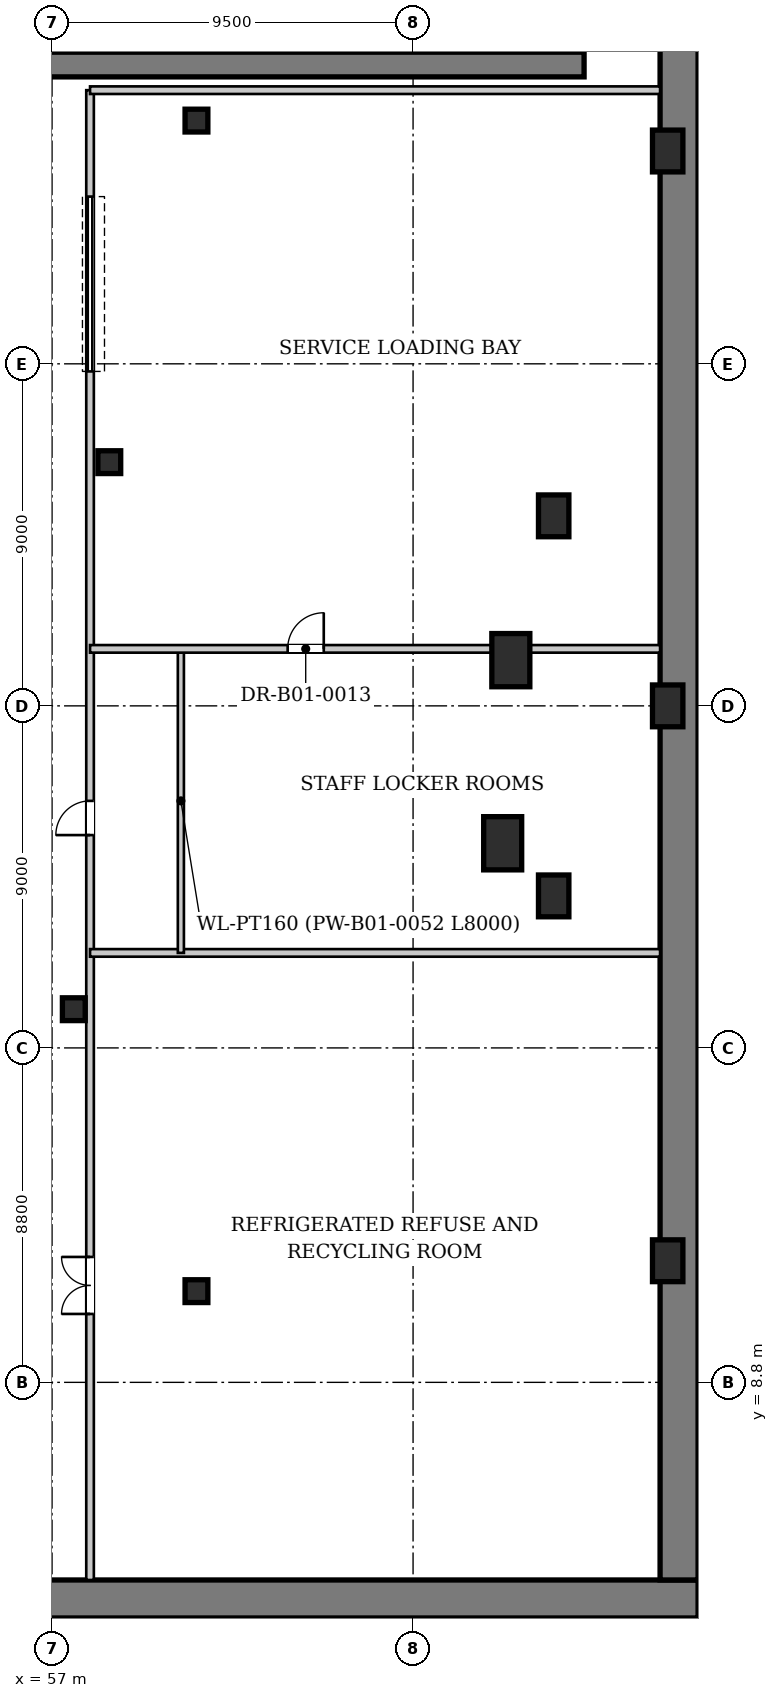
"""IFC4 building model, lengths in metres.
Left out: names, types, materials, properties, quantities, classifications, styles, units other than length and angle.
Written with IfcOpenShell. Run it as: python <this file> out.ifc"""

import sys

from ifc_helpers import new_model, si_unit, direction, frame, frame_2d, origin, origin_2d, place, context, subcontext, project, spatial, rectangle, hollow_rectangle, extrude, source, transform, mapped, element, fill, save


model = new_model("IFC4")
c1 = context("Model", 3, precision=1e-05, world=origin(), true_north=direction((0.0, 1.0)))
c2 = subcontext(c1, "Body", "Model", "MODEL_VIEW")
j1 = project(units=[si_unit("LENGTHUNIT", "METRE"), si_unit("PLANEANGLEUNIT", "RADIAN")], contexts=[c1])
p1 = place(None, origin())
s1 = spatial("IfcSite", under=j1, at=p1, CompositionType="ELEMENT")
p2 = place(p1, origin())
s2 = spatial("IfcBuilding", under=s1, at=p2, CompositionType="ELEMENT")
p3 = place(p2, frame((0.0, 0.0, -4.8)))
s3 = spatial("IfcBuildingStorey", under=s2, at=p3, CompositionType="ELEMENT", Elevation=-4.8)
p4 = place(p3, frame((2.0, 3.1, 0.0), z_axis=(0.0, 0.0, 1.0), x_axis=(1.0, 0.0, 0.0)))
e1 = element("IfcWall", 1, at=p4, inside=s3, PredefinedType="SOLIDWALL", context=c2, shape_type="SweptSolid", body=[
    extrude(rectangle(XDim=72.0, YDim=1.0, at=frame_2d((36.0, 0.0))), origin(), (0.0, 0.0, 1.0), 4.48),
])
p5 = place(p3, frame((73.5, 3.6, 0.0), z_axis=(0.0, 0.0, 1.0), x_axis=(0.0, 1.0, 0.0)))
e2 = element("IfcWall", 2, at=p5, inside=s3, PredefinedType="SOLIDWALL", context=c2, shape_type="SweptSolid", body=[
    extrude(rectangle(XDim=46.0, YDim=1.0, at=frame_2d((23.0, 0.0))), origin(), (0.0, 0.0, 1.0), 4.48),
])
p6 = place(p3, frame((10.0, 43.475, 0.0), z_axis=(0.0, 0.0, 1.0), x_axis=(1.0, 0.0, 0.0)))
e3 = element("IfcWall", 3, at=p6, inside=s3, PredefinedType="SOLIDWALL", context=c2, shape_type="SweptSolid", body=[
    extrude(rectangle(XDim=61.0, YDim=0.65, at=frame_2d((30.5, 0.0))), origin(), (0.0, 0.0, 1.0), 4.48),
])
m1 = source(origin(), c2, "Body", "SweptSolid", [
    extrude(rectangle(XDim=1.0, YDim=1.4, at=origin_2d()), origin(), (0.0, 0.0, 1.0), 4.635),
])
for number, where, z_axis, x_axis in (
    (4, (68.858, 22.985, 0.0), (0.0, 0.0, 1.0), (1.0, 0.0, 0.0)),
    (5, (69.073, 27.803, 0.0), (0.0, 0.0, 1.0), (1.0, 0.0, 0.0)),
):
    element("IfcColumn", number, at=place(p3, frame(where, z_axis=z_axis, x_axis=x_axis)), inside=s3, PredefinedType="COLUMN", context=c2, shape_type="MappedRepresentation", body=[
        mapped(m1, transform((0.0, 0.0, 0.0), x_axis=(1.0, 0.0, 0.0), y_axis=(0.0, 1.0, 0.0), z_axis=(0.0, 0.0, 1.0), scale=1.0)),
    ])
m2 = source(origin(), c2, "Body", "SweptSolid", [
    extrude(hollow_rectangle(XDim=0.6, YDim=0.6, WallThickness=0.035, at=origin_2d()), origin(), (0.0, 0.0, 1.0), 4.635),
])
for number, where, z_axis, x_axis in (
    (6, (60.8, 11.2, 0.0), (0.0, 0.0, 1.0), (1.0, 0.0, 0.0)),
    (7, (60.8, 42.0, 0.0), (0.0, 0.0, 1.0), (1.0, 0.0, 0.0)),
):
    element("IfcColumn", number, at=place(p3, frame(where, z_axis=z_axis, x_axis=x_axis)), inside=s3, PredefinedType="COLUMN", context=c2, shape_type="MappedRepresentation", body=[
        mapped(m2, transform((0.0, 0.0, 0.0), x_axis=(1.0, 0.0, 0.0), y_axis=(0.0, 1.0, 0.0), z_axis=(0.0, 0.0, 1.0), scale=1.0)),
    ])
m3 = source(origin(), c2, "Body", "SweptSolid", [
    extrude(rectangle(XDim=0.8, YDim=1.1, at=origin_2d()), origin(), (0.0, 0.0, 1.0), 4.635),
])
for number, where, z_axis, x_axis in (
    (8, (73.2, 12.0, 0.0), (0.0, 0.0, 1.0), (1.0, 0.0, 0.0)),
    (9, (73.2, 26.6, 0.0), (0.0, 0.0, 1.0), (1.0, 0.0, 0.0)),
    (10, (73.2, 41.2, 0.0), (0.0, 0.0, 1.0), (1.0, 0.0, 0.0)),
):
    element("IfcColumn", number, at=place(p3, frame(where, z_axis=z_axis, x_axis=x_axis)), inside=s3, PredefinedType="COLUMN", context=c2, shape_type="MappedRepresentation", body=[
        mapped(m3, transform((0.0, 0.0, 0.0), x_axis=(1.0, 0.0, 0.0), y_axis=(0.0, 1.0, 0.0), z_axis=(0.0, 0.0, 1.0), scale=1.0)),
    ])
for number, where, z_axis, x_axis in (
    (11, (58.507, 33.013, 0.0), (0.0, 0.0, 1.0), (1.0, 0.0, 0.0)),
    (12, (57.572, 18.618, 0.0), (0.0, 0.0, 1.0), (1.0, 0.0, 0.0)),
):
    element("IfcColumn", number, at=place(p3, frame(where, z_axis=z_axis, x_axis=x_axis)), inside=s3, PredefinedType="COLUMN", context=c2, shape_type="MappedRepresentation", body=[
        mapped(m2, transform((0.0, 0.0, 0.0), x_axis=(1.0, 0.0, 0.0), y_axis=(0.0, 1.0, 0.0), z_axis=(0.0, 0.0, 1.0), scale=1.0)),
    ])
for number, where, z_axis, x_axis in (
    (13, (70.2, 21.6, 0.0), (0.0, 0.0, 1.0), (1.0, 0.0, 0.0)),
    (14, (70.2, 31.6, 0.0), (0.0, 0.0, 1.0), (1.0, 0.0, 0.0)),
):
    element("IfcColumn", number, at=place(p3, frame(where, z_axis=z_axis, x_axis=x_axis)), inside=s3, PredefinedType="COLUMN", context=c2, shape_type="MappedRepresentation", body=[
        mapped(m3, transform((0.0, 0.0, 0.0), x_axis=(1.0, 0.0, 0.0), y_axis=(0.0, 1.0, 0.0), z_axis=(0.0, 0.0, 1.0), scale=1.0)),
    ])
p7 = place(p3, frame((58.0, 3.6, 0.0), z_axis=(0.0, 0.0, 1.0), x_axis=(0.0, 1.0, 0.0)))
e15 = element("IfcWall", 15, at=p7, inside=s3, PredefinedType="PARTITIONING", context=c2, shape_type="SweptSolid", body=[
    extrude(rectangle(XDim=39.2, YDim=0.2, at=frame_2d((19.6, 0.0))), origin(), (0.0, 0.0, 1.0), 4.48),
])
p8 = place(p7, frame((7.0, 0.0, 0.0)))
e16 = element("IfcOpeningElement", 16, at=p8, cuts=e15, PredefinedType="OPENING", context=c2, shape_type="SweptSolid", body=[
    extrude(rectangle(XDim=1.5, YDim=2.25, at=frame_2d((0.75, 1.125))), frame((0.0, 0.11, 0.0), z_axis=(0.0, -1.0, 0.0), x_axis=(1.0, 0.0, 0.0)), (0.0, 0.0, 1.0), 0.22),
])
p9 = place(p7, frame((19.6, 0.0, 0.0)))
e17 = element("IfcOpeningElement", 17, at=p9, cuts=e15, PredefinedType="OPENING", context=c2, shape_type="SweptSolid", body=[
    extrude(rectangle(XDim=0.9, YDim=2.1, at=frame_2d((0.45, 1.05))), frame((0.0, 0.11, 0.0), z_axis=(0.0, -1.0, 0.0), x_axis=(1.0, 0.0, 0.0)), (0.0, 0.0, 1.0), 0.22),
])
p10 = place(p7, frame((31.8, 0.0, 0.0)))
e18 = element("IfcOpeningElement", 18, at=p10, cuts=e15, PredefinedType="OPENING", context=c2, shape_type="SweptSolid", body=[
    extrude(rectangle(XDim=4.6, YDim=3.8, at=frame_2d((2.3, 1.9))), frame((0.0, 0.11, 0.0), z_axis=(0.0, -1.0, 0.0), x_axis=(1.0, 0.0, 0.0)), (0.0, 0.0, 1.0), 0.22),
])
p11 = place(p3, frame((58.0, 20.1, 0.0), z_axis=(0.0, 0.0, 1.0), x_axis=(1.0, 0.0, 0.0)))
e19 = element("IfcWall", 19, at=p11, inside=s3, PredefinedType="PARTITIONING", context=c2, shape_type="SweptSolid", body=[
    extrude(rectangle(XDim=15.0, YDim=0.2, at=frame_2d((7.5, 0.0))), origin(), (0.0, 0.0, 1.0), 3.665),
])
p12 = place(p3, frame((60.39, 20.1, 0.0), z_axis=(0.0, 0.0, 1.0), x_axis=(0.0, 1.0, 0.0)))
e20 = element("IfcWall", 20, at=p12, inside=s3, PredefinedType="PARTITIONING", context=c2, shape_type="SweptSolid", body=[
    extrude(rectangle(XDim=8.0, YDim=0.16, at=frame_2d((4.0, 0.0))), origin(), (0.0, 0.0, 1.0), 4.48),
])
p13 = place(p3, frame((58.0, 28.1, 0.0), z_axis=(0.0, 0.0, 1.0), x_axis=(1.0, 0.0, 0.0)))
e21 = element("IfcWall", 21, at=p13, inside=s3, PredefinedType="PARTITIONING", context=c2, shape_type="SweptSolid", body=[
    extrude(rectangle(XDim=15.0, YDim=0.2, at=frame_2d((7.5, 0.0))), origin(), (0.0, 0.0, 1.0), 3.665),
])
p14 = place(p13, frame((5.2, 0.0, 0.0)))
e22 = element("IfcOpeningElement", 22, at=p14, cuts=e21, PredefinedType="OPENING", context=c2, shape_type="SweptSolid", body=[
    extrude(rectangle(XDim=0.95, YDim=2.1, at=frame_2d((0.475, 1.05))), frame((0.0, 0.11, 0.0), z_axis=(0.0, -1.0, 0.0), x_axis=(1.0, 0.0, 0.0)), (0.0, 0.0, 1.0), 0.22),
])
p15 = place(p3, frame((58.0, 42.8, 0.0), z_axis=(0.0, 0.0, 1.0), x_axis=(1.0, 0.0, 0.0)))
e23 = element("IfcWall", 23, at=p15, inside=s3, PredefinedType="PARTITIONING", context=c2, shape_type="SweptSolid", body=[
    extrude(rectangle(XDim=15.0, YDim=0.2, at=frame_2d((7.5, 0.0))), origin(), (0.0, 0.0, 1.0), 4.48),
])
m4 = source(origin(), c2, "Body", "SweptSolid", [
    extrude(rectangle(XDim=1.5, YDim=2.25, at=frame_2d((0.75, 1.125))), frame((0.0, 0.025, 0.0), z_axis=(0.0, -1.0, 0.0), x_axis=(1.0, 0.0, 0.0)), (0.0, 0.0, 1.0), 0.05),
])
p16 = place(p8, origin())
e24 = element("IfcDoor", 24, at=p16, inside=s3, OperationType="DOUBLE_DOOR_SINGLE_SWING", PredefinedType="DOOR", context=c2, shape_type="MappedRepresentation", body=[
    mapped(m4, transform((0.0, 0.0, 0.0), x_axis=(1.0, 0.0, 0.0), y_axis=(0.0, 1.0, 0.0), z_axis=(0.0, 0.0, 1.0), scale=1.0)),
])
fill(e16, e24)
m5 = source(origin(), c2, "Body", "SweptSolid", [
    extrude(rectangle(XDim=0.9, YDim=2.1, at=frame_2d((0.45, 1.05))), frame((0.0, 0.025, 0.0), z_axis=(0.0, -1.0, 0.0), x_axis=(1.0, 0.0, 0.0)), (0.0, 0.0, 1.0), 0.05),
])
p17 = place(p9, origin())
e25 = element("IfcDoor", 25, at=p17, inside=s3, OperationType="SINGLE_SWING_LEFT", PredefinedType="DOOR", context=c2, shape_type="MappedRepresentation", body=[
    mapped(m5, transform((0.0, 0.0, 0.0), x_axis=(1.0, 0.0, 0.0), y_axis=(0.0, 1.0, 0.0), z_axis=(0.0, 0.0, 1.0), scale=1.0)),
])
fill(e17, e25)
m6 = source(origin(), c2, "Body", "SweptSolid", [
    extrude(rectangle(XDim=4.6, YDim=3.8, at=frame_2d((2.3, 1.9))), frame((0.0, 0.025, 0.0), z_axis=(0.0, -1.0, 0.0), x_axis=(1.0, 0.0, 0.0)), (0.0, 0.0, 1.0), 0.05),
])
p18 = place(p10, origin())
e26 = element("IfcDoor", 26, at=p18, inside=s3, OperationType="ROLLINGUP", PredefinedType="GATE", context=c2, shape_type="MappedRepresentation", body=[
    mapped(m6, transform((0.0, 0.0, 0.0), x_axis=(1.0, 0.0, 0.0), y_axis=(0.0, 1.0, 0.0), z_axis=(0.0, 0.0, 1.0), scale=1.0)),
])
fill(e18, e26)
m7 = source(origin(), c2, "Body", "SweptSolid", [
    extrude(rectangle(XDim=0.95, YDim=2.1, at=frame_2d((0.475, 1.05))), frame((0.0, 0.025, 0.0), z_axis=(0.0, -1.0, 0.0), x_axis=(1.0, 0.0, 0.0)), (0.0, 0.0, 1.0), 0.05),
])
p19 = place(p14, origin())
e27 = element("IfcDoor", 27, at=p19, inside=s3, OperationType="SINGLE_SWING_RIGHT", PredefinedType="DOOR", context=c2, shape_type="MappedRepresentation", body=[
    mapped(m7, transform((0.0, 0.0, 0.0), x_axis=(1.0, 0.0, 0.0), y_axis=(0.0, 1.0, 0.0), z_axis=(0.0, 0.0, 1.0), scale=1.0)),
])
fill(e22, e27)
save(model, sys.argv[1])
